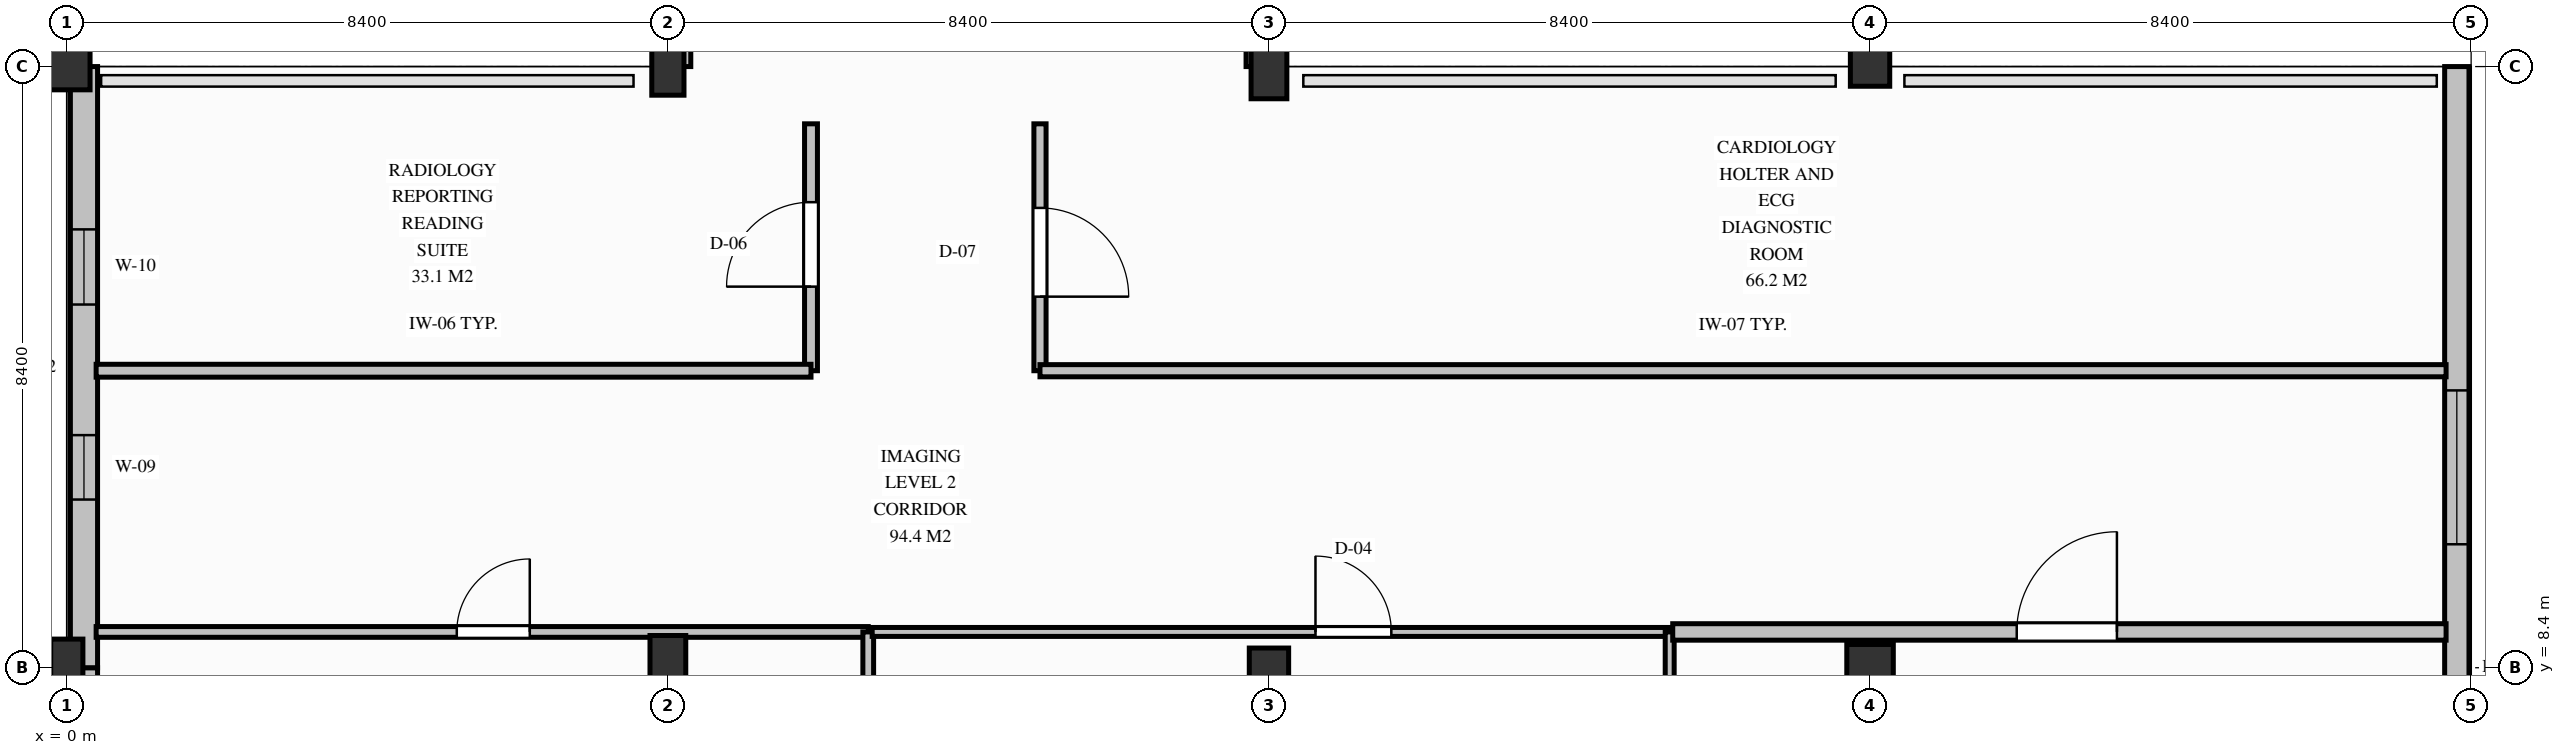
"""IFC4 building model, lengths in metres.
Left out: names, types, materials, properties, quantities, classifications, styles, units other than length and angle.
Written with IfcOpenShell. Run it as: python <this file> out.ifc"""

import sys

from ifc_helpers import new_model, si_unit, direction, frame, frame_2d, origin, origin_2d, place, context, subcontext, project, spatial, rectangle, circle, extrude, element, fill, save


model = new_model("IFC4")
c1 = context("Model", 3, precision=1e-05, world=origin(), true_north=direction((0.0, 1.0)))
c2 = subcontext(c1, "Body", "Model", "MODEL_VIEW")
j1 = project(units=[si_unit("LENGTHUNIT", "METRE"), si_unit("PLANEANGLEUNIT", "RADIAN")], contexts=[c1])
p1 = place(None, origin())
s1 = spatial("IfcSite", under=j1, at=p1, CompositionType="ELEMENT")
p2 = place(p1, origin())
s2 = spatial("IfcBuilding", under=s1, at=p2, CompositionType="ELEMENT")
p3 = place(p2, frame((0.0, 0.0, 9.0)))
s3 = spatial("IfcBuildingStorey", under=s2, at=p3, CompositionType="ELEMENT", Elevation=9.0)
p4 = place(p3, frame((0.0, 8.4, 0.0), z_axis=(0.0, 0.0, 1.0), x_axis=(1.0, 0.0, 0.0)))
e1 = element("IfcColumn", 1, at=p4, inside=s3, PredefinedType="COLUMN", context=c2, shape_type="SweptSolid", body=[
    extrude(rectangle(XDim=0.45, YDim=0.8, at=origin_2d()), origin(), (0.0, 0.0, 1.0), 4.2),
])
p5 = place(p3, frame((0.0, 16.8, 0.0), z_axis=(0.0, 0.0, 1.0), x_axis=(1.0, 0.0, 0.0)))
e2 = element("IfcColumn", 2, at=p5, inside=s3, PredefinedType="COLUMN", context=c2, shape_type="SweptSolid", body=[
    extrude(circle(Radius=0.325, at=origin_2d()), origin(), (0.0, 0.0, 1.0), 4.2),
])
p6 = place(p3, frame((8.4, 8.4, 0.0), z_axis=(0.0, 0.0, 1.0), x_axis=(1.0, 0.0, 0.0)))
e3 = element("IfcColumn", 3, at=p6, inside=s3, PredefinedType="COLUMN", context=c2, shape_type="SweptSolid", body=[
    extrude(rectangle(XDim=0.5, YDim=0.9, at=origin_2d()), origin(), (0.0, 0.0, 1.0), 4.2),
])
p7 = place(p3, frame((8.4, 16.8, 0.0), z_axis=(0.0, 0.0, 1.0), x_axis=(1.0, 0.0, 0.0)))
e4 = element("IfcColumn", 4, at=p7, inside=s3, PredefinedType="COLUMN", context=c2, shape_type="SweptSolid", body=[
    extrude(rectangle(XDim=0.45, YDim=0.8, at=origin_2d()), origin(), (0.0, 0.0, 1.0), 4.2),
])
p8 = place(p3, frame((16.8, 8.4, 0.0), z_axis=(0.0, 0.0, 1.0), x_axis=(1.0, 0.0, 0.0)))
e5 = element("IfcColumn", 5, at=p8, inside=s3, PredefinedType="COLUMN", context=c2, shape_type="SweptSolid", body=[
    extrude(circle(Radius=0.275, at=origin_2d()), origin(), (0.0, 0.0, 1.0), 4.2),
])
p9 = place(p3, frame((16.8, 16.8, 0.0), z_axis=(0.0, 0.0, 1.0), x_axis=(1.0, 0.0, 0.0)))
e6 = element("IfcColumn", 6, at=p9, inside=s3, PredefinedType="COLUMN", context=c2, shape_type="SweptSolid", body=[
    extrude(rectangle(XDim=0.5, YDim=0.9, at=origin_2d()), origin(), (0.0, 0.0, 1.0), 4.2),
])
p10 = place(p3, frame((25.2, 8.4, 0.0), z_axis=(0.0, 0.0, 1.0), x_axis=(1.0, 0.0, 0.0)))
e7 = element("IfcColumn", 7, at=p10, inside=s3, PredefinedType="COLUMN", context=c2, shape_type="SweptSolid", body=[
    extrude(circle(Radius=0.325, at=origin_2d()), origin(), (0.0, 0.0, 1.0), 4.2),
])
p11 = place(p3, frame((25.2, 16.8, 0.0), z_axis=(0.0, 0.0, 1.0), x_axis=(1.0, 0.0, 0.0)))
e8 = element("IfcColumn", 8, at=p11, inside=s3, PredefinedType="COLUMN", context=c2, shape_type="SweptSolid", body=[
    extrude(circle(Radius=0.275, at=origin_2d()), origin(), (0.0, 0.0, 1.0), 4.2),
])
p12 = place(p3, frame((0.24, 0.0, 0.0), z_axis=(0.0, 0.0, 1.0), x_axis=(0.0, 1.0, 0.0)))
e9 = element("IfcWall", 9, at=p12, inside=s3, PredefinedType="SOLIDWALL", context=c2, shape_type="SweptSolid", body=[
    extrude(rectangle(XDim=8.4, YDim=0.38, at=frame_2d((4.2, 0.0))), origin(), (0.0, 0.0, 1.0), 2.568),
])
p13 = place(p12, frame((2.35, 0.0, 0.85)))
e10 = element("IfcOpeningElement", 10, at=p13, cuts=e9, PredefinedType="OPENING", context=c2, shape_type="SweptSolid", body=[
    extrude(rectangle(XDim=0.9, YDim=1.538, at=frame_2d((0.45, 0.769))), frame((0.0, 0.2, 0.0), z_axis=(0.0, -1.0, 0.0), x_axis=(1.0, 0.0, 0.0)), (0.0, 0.0, 1.0), 0.4),
])
p14 = place(p12, frame((5.075, 0.0, 0.85)))
e11 = element("IfcOpeningElement", 11, at=p14, cuts=e9, PredefinedType="OPENING", context=c2, shape_type="SweptSolid", body=[
    extrude(rectangle(XDim=1.05, YDim=1.538, at=frame_2d((0.525, 0.769))), frame((0.0, 0.2, 0.0), z_axis=(0.0, -1.0, 0.0), x_axis=(1.0, 0.0, 0.0)), (0.0, 0.0, 1.0), 0.4),
])
p15 = place(p3, frame((0.24, 8.4, 0.0), z_axis=(0.0, 0.0, 1.0), x_axis=(0.0, 1.0, 0.0)))
e12 = element("IfcWall", 12, at=p15, inside=s3, PredefinedType="SOLIDWALL", context=c2, shape_type="SweptSolid", body=[
    extrude(rectangle(XDim=8.4, YDim=0.38, at=frame_2d((4.2, 0.0))), origin(), (0.0, 0.0, 1.0), 3.478),
])
p16 = place(p15, frame((2.35, 0.0, 0.85)))
e13 = element("IfcOpeningElement", 13, at=p16, cuts=e12, PredefinedType="OPENING", context=c2, shape_type="SweptSolid", body=[
    extrude(rectangle(XDim=0.9, YDim=1.8, at=frame_2d((0.45, 0.9))), frame((0.0, 0.2, 0.0), z_axis=(0.0, -1.0, 0.0), x_axis=(1.0, 0.0, 0.0)), (0.0, 0.0, 1.0), 0.4),
])
p17 = place(p15, frame((5.075, 0.0, 0.85)))
e14 = element("IfcOpeningElement", 14, at=p17, cuts=e12, PredefinedType="OPENING", context=c2, shape_type="SweptSolid", body=[
    extrude(rectangle(XDim=1.05, YDim=1.75, at=frame_2d((0.525, 0.875))), frame((0.0, 0.2, 0.0), z_axis=(0.0, -1.0, 0.0), x_axis=(1.0, 0.0, 0.0)), (0.0, 0.0, 1.0), 0.4),
])
p18 = place(p3, frame((8.55, 16.8, 0.0), z_axis=(0.0, 0.0, 1.0), x_axis=(0.0, 1.0, 0.0)))
e15 = element("IfcWall", 15, at=p18, inside=s3, PredefinedType="SOLIDWALL", context=c2, shape_type="SweptSolid", body=[
    extrude(rectangle(XDim=8.4, YDim=0.34, at=frame_2d((4.2, 0.0))), origin(), (0.0, 0.0, 1.0), 3.418),
])
p19 = place(p18, frame((3.125, 0.0, 0.85)))
e16 = element("IfcOpeningElement", 16, at=p19, cuts=e15, PredefinedType="OPENING", context=c2, shape_type="SweptSolid", body=[
    extrude(rectangle(XDim=2.15, YDim=1.75, at=frame_2d((1.075, 0.875))), frame((0.0, 0.18, 0.0), z_axis=(0.0, -1.0, 0.0), x_axis=(1.0, 0.0, 0.0)), (0.0, 0.0, 1.0), 0.36),
])
p20 = place(p3, frame((16.65, 25.2, 0.0), z_axis=(0.0, 0.0, 1.0), x_axis=(0.0, -1.0, 0.0)))
e17 = element("IfcWall", 17, at=p20, inside=s3, PredefinedType="SOLIDWALL", context=c2, shape_type="SweptSolid", body=[
    extrude(rectangle(XDim=8.4, YDim=0.34, at=frame_2d((4.2, 0.0))), origin(), (0.0, 0.0, 1.0), 3.468),
])
p21 = place(p20, frame((3.025, 0.0, 0.85)))
e18 = element("IfcOpeningElement", 18, at=p21, cuts=e17, PredefinedType="OPENING", context=c2, shape_type="SweptSolid", body=[
    extrude(rectangle(XDim=2.35, YDim=1.8, at=frame_2d((1.175, 0.9))), frame((0.0, 0.18, 0.0), z_axis=(0.0, -1.0, 0.0), x_axis=(1.0, 0.0, 0.0)), (0.0, 0.0, 1.0), 0.36),
])
p22 = place(p3, frame((33.4, 16.8, 0.0), z_axis=(0.0, 0.0, 1.0), x_axis=(0.0, -1.0, 0.0)))
e19 = element("IfcWall", 19, at=p22, inside=s3, PredefinedType="SOLIDWALL", context=c2, shape_type="SweptSolid", body=[
    extrude(rectangle(XDim=16.8, YDim=0.34, at=frame_2d((8.4, 0.0))), origin(), (0.0, 0.0, 1.0), 3.668),
])
p23 = place(p22, frame((4.525, 0.0, 0.85)))
e20 = element("IfcOpeningElement", 20, at=p23, cuts=e19, PredefinedType="OPENING", context=c2, shape_type="SweptSolid", body=[
    extrude(rectangle(XDim=2.15, YDim=1.75, at=frame_2d((1.075, 0.875))), frame((0.0, 0.18, 0.0), z_axis=(0.0, -1.0, 0.0), x_axis=(1.0, 0.0, 0.0)), (0.0, 0.0, 1.0), 0.36),
])
p24 = place(p22, frame((10.025, 0.0, 0.85)))
e21 = element("IfcOpeningElement", 21, at=p24, cuts=e19, PredefinedType="OPENING", context=c2, shape_type="SweptSolid", body=[
    extrude(rectangle(XDim=2.35, YDim=1.8, at=frame_2d((1.175, 0.9))), frame((0.0, 0.18, 0.0), z_axis=(0.0, -1.0, 0.0), x_axis=(1.0, 0.0, 0.0)), (0.0, 0.0, 1.0), 0.36),
])
p25 = place(p3, frame((0.41, 8.9, 0.0), z_axis=(0.0, 0.0, 1.0), x_axis=(1.0, 0.0, 0.0)))
e22 = element("IfcWall", 22, at=p25, inside=s3, PredefinedType="PARTITIONING", context=c2, shape_type="SweptSolid", body=[
    extrude(rectangle(XDim=10.79, YDim=0.15, at=frame_2d((5.395, 0.0))), origin(), (0.0, 0.0, 1.0), 3.578),
])
p26 = place(p25, frame((5.04, 0.0, 0.0)))
e23 = element("IfcOpeningElement", 23, at=p26, cuts=e22, PredefinedType="OPENING", context=c2, shape_type="SweptSolid", body=[
    extrude(rectangle(XDim=1.02, YDim=2.15, at=frame_2d((0.51, 1.075))), frame((0.0, 0.085, 0.0), z_axis=(0.0, -1.0, 0.0), x_axis=(1.0, 0.0, 0.0)), (0.0, 0.0, 1.0), 0.17),
])
p27 = place(p3, frame((11.2, 8.9, 0.0), z_axis=(0.0, 0.0, 1.0), x_axis=(0.0, -1.0, 0.0)))
e24 = element("IfcWall", 24, at=p27, inside=s3, PredefinedType="PARTITIONING", context=c2, shape_type="SweptSolid", body=[
    extrude(rectangle(XDim=8.47, YDim=0.15, at=frame_2d((4.235, 0.0))), origin(), (0.0, 0.0, 1.0), 3.528),
])
p28 = place(p3, frame((11.255, 8.9, 0.0), z_axis=(0.0, 0.0, 1.0), x_axis=(1.0, 0.0, 0.0)))
e25 = element("IfcWall", 25, at=p28, inside=s3, PredefinedType="PARTITIONING", context=c2, shape_type="SweptSolid", body=[
    extrude(rectangle(XDim=11.145, YDim=0.125, at=frame_2d((5.573, 0.0))), origin(), (0.0, 0.0, 1.0), 3.468),
])
p29 = place(p28, frame((6.195, 0.0, 0.0)))
e26 = element("IfcOpeningElement", 26, at=p29, cuts=e25, PredefinedType="OPENING", context=c2, shape_type="SweptSolid", body=[
    extrude(rectangle(XDim=1.06, YDim=2.16, at=frame_2d((0.53, 1.08))), frame((0.0, 0.073, 0.0), z_axis=(0.0, -1.0, 0.0), x_axis=(1.0, 0.0, 0.0)), (0.0, 0.0, 1.0), 0.145),
])
p30 = place(p3, frame((22.4, 8.9, 0.0), z_axis=(0.0, 0.0, 1.0), x_axis=(0.0, -1.0, 0.0)))
e27 = element("IfcWall", 27, at=p30, inside=s3, PredefinedType="PARTITIONING", context=c2, shape_type="SweptSolid", body=[
    extrude(rectangle(XDim=8.47, YDim=0.125, at=frame_2d((4.235, 0.0))), origin(), (0.0, 0.0, 1.0), 3.588),
])
p31 = place(p3, frame((22.442, 8.9, 0.0), z_axis=(0.0, 0.0, 1.0), x_axis=(1.0, 0.0, 0.0)))
e28 = element("IfcWall", 28, at=p31, inside=s3, PredefinedType="PARTITIONING", context=c2, shape_type="SweptSolid", body=[
    extrude(rectangle(XDim=10.808, YDim=0.23, at=frame_2d((5.404, 0.0))), origin(), (0.0, 0.0, 1.0), 3.368),
])
p32 = place(p31, frame((4.808, 0.0, 0.0)))
e29 = element("IfcOpeningElement", 29, at=p32, cuts=e28, PredefinedType="OPENING", context=c2, shape_type="SweptSolid", body=[
    extrude(rectangle(XDim=1.4, YDim=2.2, at=frame_2d((0.7, 1.1))), frame((0.0, 0.125, 0.0), z_axis=(0.0, -1.0, 0.0), x_axis=(1.0, 0.0, 0.0)), (0.0, 0.0, 1.0), 0.25),
])
p33 = place(p3, frame((10.4, 12.55, 0.0), z_axis=(0.0, 0.0, 1.0), x_axis=(0.0, 1.0, 0.0)))
e30 = element("IfcWall", 30, at=p33, inside=s3, PredefinedType="PARTITIONING", context=c2, shape_type="SweptSolid", body=[
    extrude(rectangle(XDim=3.45, YDim=0.18, at=frame_2d((1.725, 0.0))), origin(), (0.0, 0.0, 1.0), 3.93),
])
p34 = place(p33, frame((1.175, 0.0, 0.0)))
e31 = element("IfcOpeningElement", 31, at=p34, cuts=e30, PredefinedType="OPENING", context=c2, shape_type="SweptSolid", body=[
    extrude(rectangle(XDim=1.18, YDim=2.2, at=frame_2d((0.59, 1.1))), frame((0.0, 0.1, 0.0), z_axis=(0.0, -1.0, 0.0), x_axis=(1.0, 0.0, 0.0)), (0.0, 0.0, 1.0), 0.2),
])
p35 = place(p3, frame((0.41, 12.55, 0.0), z_axis=(0.0, 0.0, 1.0), x_axis=(1.0, 0.0, 0.0)))
e32 = element("IfcWall", 32, at=p35, inside=s3, PredefinedType="PARTITIONING", context=c2, shape_type="SweptSolid", body=[
    extrude(rectangle(XDim=9.99, YDim=0.18, at=frame_2d((4.995, 0.0))), origin(), (0.0, 0.0, 1.0), 3.578),
])
p36 = place(p3, frame((13.6, 16.0, 0.0), z_axis=(0.0, 0.0, 1.0), x_axis=(0.0, -1.0, 0.0)))
e33 = element("IfcWall", 33, at=p36, inside=s3, PredefinedType="PARTITIONING", context=c2, shape_type="SweptSolid", body=[
    extrude(rectangle(XDim=3.45, YDim=0.17, at=frame_2d((1.725, 0.0))), origin(), (0.0, 0.0, 1.0), 3.93),
])
p37 = place(p36, frame((1.175, 0.0, 0.0)))
e34 = element("IfcOpeningElement", 34, at=p37, cuts=e33, PredefinedType="OPENING", context=c2, shape_type="SweptSolid", body=[
    extrude(rectangle(XDim=1.24, YDim=2.2, at=frame_2d((0.62, 1.1))), frame((0.0, 0.095, 0.0), z_axis=(0.0, -1.0, 0.0), x_axis=(1.0, 0.0, 0.0)), (0.0, 0.0, 1.0), 0.19),
])
p38 = place(p3, frame((13.6, 12.55, 0.0), z_axis=(0.0, 0.0, 1.0), x_axis=(1.0, 0.0, 0.0)))
e35 = element("IfcWall", 35, at=p38, inside=s3, PredefinedType="PARTITIONING", context=c2, shape_type="SweptSolid", body=[
    extrude(rectangle(XDim=19.65, YDim=0.17, at=frame_2d((9.825, 0.0))), origin(), (0.0, 0.0, 1.0), 3.368),
])
p39 = place(p16, origin())
e36 = element("IfcWindow", 36, at=p39, inside=s3, PartitioningType="SINGLE_PANEL", PredefinedType="WINDOW", context=c2, shape_type="SweptSolid", body=[
    extrude(rectangle(XDim=0.9, YDim=1.8, at=frame_2d((0.45, 0.9))), frame((0.0, 0.03, 0.0), z_axis=(0.0, -1.0, 0.0), x_axis=(1.0, 0.0, 0.0)), (0.0, 0.0, 1.0), 0.06),
])
fill(e13, e36)
p40 = place(p17, origin())
e37 = element("IfcWindow", 37, at=p40, inside=s3, PartitioningType="SINGLE_PANEL", PredefinedType="WINDOW", context=c2, shape_type="SweptSolid", body=[
    extrude(rectangle(XDim=1.05, YDim=1.75, at=frame_2d((0.525, 0.875))), frame((0.0, 0.03, 0.0), z_axis=(0.0, -1.0, 0.0), x_axis=(1.0, 0.0, 0.0)), (0.0, 0.0, 1.0), 0.06),
])
fill(e14, e37)
p41 = place(p23, origin())
e38 = element("IfcWindow", 38, at=p41, inside=s3, PartitioningType="SINGLE_PANEL", PredefinedType="WINDOW", context=c2, shape_type="SweptSolid", body=[
    extrude(rectangle(XDim=2.15, YDim=1.75, at=frame_2d((1.075, 0.875))), frame((0.0, 0.03, 0.0), z_axis=(0.0, -1.0, 0.0), x_axis=(1.0, 0.0, 0.0)), (0.0, 0.0, 1.0), 0.06),
])
fill(e20, e38)
p42 = place(p26, origin())
e39 = element("IfcDoor", 39, at=p42, inside=s3, OperationType="SINGLE_SWING_RIGHT", PredefinedType="DOOR", context=c2, shape_type="SweptSolid", body=[
    extrude(rectangle(XDim=1.02, YDim=2.15, at=frame_2d((0.51, 1.075))), frame((0.0, 0.025, 0.0), z_axis=(0.0, -1.0, 0.0), x_axis=(1.0, 0.0, 0.0)), (0.0, 0.0, 1.0), 0.05),
])
fill(e23, e39)
p43 = place(p29, origin())
e40 = element("IfcDoor", 40, at=p43, inside=s3, OperationType="SINGLE_SWING_LEFT", PredefinedType="DOOR", context=c2, shape_type="SweptSolid", body=[
    extrude(rectangle(XDim=1.06, YDim=2.16, at=frame_2d((0.53, 1.08))), frame((0.0, 0.025, 0.0), z_axis=(0.0, -1.0, 0.0), x_axis=(1.0, 0.0, 0.0)), (0.0, 0.0, 1.0), 0.05),
])
fill(e26, e40)
p44 = place(p32, origin())
e41 = element("IfcDoor", 41, at=p44, inside=s3, OperationType="SINGLE_SWING_RIGHT", PredefinedType="DOOR", context=c2, shape_type="SweptSolid", body=[
    extrude(rectangle(XDim=1.4, YDim=2.2, at=frame_2d((0.7, 1.1))), frame((0.0, 0.025, 0.0), z_axis=(0.0, -1.0, 0.0), x_axis=(1.0, 0.0, 0.0)), (0.0, 0.0, 1.0), 0.05),
])
fill(e29, e41)
p45 = place(p34, origin())
e42 = element("IfcDoor", 42, at=p45, inside=s3, OperationType="SINGLE_SWING_LEFT", PredefinedType="DOOR", context=c2, shape_type="SweptSolid", body=[
    extrude(rectangle(XDim=1.18, YDim=2.2, at=frame_2d((0.59, 1.1))), frame((0.0, 0.025, 0.0), z_axis=(0.0, -1.0, 0.0), x_axis=(1.0, 0.0, 0.0)), (0.0, 0.0, 1.0), 0.05),
])
fill(e31, e42)
p46 = place(p37, origin())
e43 = element("IfcDoor", 43, at=p46, inside=s3, OperationType="SINGLE_SWING_RIGHT", PredefinedType="DOOR", context=c2, shape_type="SweptSolid", body=[
    extrude(rectangle(XDim=1.24, YDim=2.2, at=frame_2d((0.62, 1.1))), frame((0.0, 0.025, 0.0), z_axis=(0.0, -1.0, 0.0), x_axis=(1.0, 0.0, 0.0)), (0.0, 0.0, 1.0), 0.05),
])
fill(e34, e43)
save(model, sys.argv[1])
